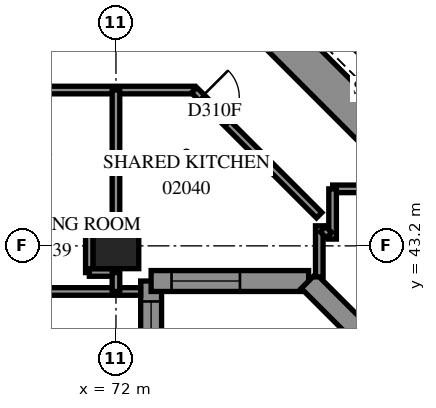
"""IFC4 building model, lengths in metres.
Left out: names, types, materials, properties, quantities, classifications, styles, units other than length and angle.
Written with IfcOpenShell. Run it as: python <this file> out.ifc"""

import sys

from ifc_helpers import new_model, si_unit, direction, frame, frame_2d, origin, origin_2d, place, context, subcontext, project, spatial, polyline, rectangle, outline, extrude, element, fill, save


model = new_model("IFC4")
c1 = context("Model", 3, precision=1e-05, world=origin(), true_north=direction((0.0, 1.0)))
c2 = subcontext(c1, "Body", "Model", "MODEL_VIEW")
j1 = project(units=[si_unit("LENGTHUNIT", "METRE"), si_unit("PLANEANGLEUNIT", "RADIAN")], contexts=[c1])
p1 = place(None, origin())
s1 = spatial("IfcSite", under=j1, at=p1, CompositionType="ELEMENT")
p2 = place(p1, origin())
s2 = spatial("IfcBuilding", under=s1, at=p2, CompositionType="ELEMENT")
p3 = place(p2, frame((0.0, 0.0, 10.2)))
s3 = spatial("IfcBuildingStorey", under=s2, at=p3, CompositionType="ELEMENT", Elevation=10.2)
p4 = place(p3, frame((72.0, 43.2, 0.0), z_axis=(0.0, 0.0, 1.0), x_axis=(1.0, 0.0, 0.0)))
e1 = element("IfcColumn", 1, at=p4, inside=s3, PredefinedType="COLUMN", context=c2, shape_type="SweptSolid", body=[
    extrude(rectangle(XDim=1.2, YDim=1.2, at=origin_2d()), origin(), (0.0, 0.0, 1.0), 3.8),
])
p5 = place(p3, frame((75.594, 49.443, -0.4), z_axis=(0.0, 0.0, 1.0), x_axis=(0.7071037324, -0.70710983, 0.0)))
e2 = element("IfcWall", 2, at=p5, inside=s3, PredefinedType="SHEAR", context=c2, shape_type="SweptSolid", body=[
    extrude(rectangle(XDim=16.4, YDim=1.0, at=frame_2d((8.2, 0.0))), origin(), (0.0, 0.0, 1.0), 3.5),
])
p6 = place(p3, frame((72.925, 20.675, 0.0), z_axis=(0.0, 0.0, 1.0), x_axis=(0.0, 1.0, 0.0)))
e3 = element("IfcWall", 3, at=p6, inside=s3, PredefinedType="SOLIDWALL", context=c2, shape_type="SweptSolid", body=[
    extrude(outline(polyline([(-0.275, -0.275), (21.325, -0.275), (21.875, 0.275), (0.275, 0.275), (-0.275, -0.275)])), origin(), (0.0, 0.0, 1.0), 3.8),
])
p7 = place(p6, frame((1.825, 0.0, 0.7)))
e4 = element("IfcOpeningElement", 4, at=p7, cuts=e3, PredefinedType="OPENING", context=c2, shape_type="SweptSolid", body=[
    extrude(rectangle(XDim=1.8, YDim=2.6, at=frame_2d((0.9, 1.3))), frame((0.0, 0.285, 0.0), z_axis=(0.0, -1.0, 0.0), x_axis=(1.0, 0.0, 0.0)), (0.0, 0.0, 1.0), 0.57),
])
p8 = place(p6, frame((5.425, 0.0, 0.7)))
e5 = element("IfcOpeningElement", 5, at=p8, cuts=e3, PredefinedType="OPENING", context=c2, shape_type="SweptSolid", body=[
    extrude(rectangle(XDim=1.8, YDim=2.6, at=frame_2d((0.9, 1.3))), frame((0.0, 0.285, 0.0), z_axis=(0.0, -1.0, 0.0), x_axis=(1.0, 0.0, 0.0)), (0.0, 0.0, 1.0), 0.57),
])
p9 = place(p6, frame((9.025, 0.0, 0.7)))
e6 = element("IfcOpeningElement", 6, at=p9, cuts=e3, PredefinedType="OPENING", context=c2, shape_type="SweptSolid", body=[
    extrude(rectangle(XDim=1.8, YDim=2.6, at=frame_2d((0.9, 1.3))), frame((0.0, 0.285, 0.0), z_axis=(0.0, -1.0, 0.0), x_axis=(1.0, 0.0, 0.0)), (0.0, 0.0, 1.0), 0.57),
])
p10 = place(p6, frame((12.625, 0.0, 0.7)))
e7 = element("IfcOpeningElement", 7, at=p10, cuts=e3, PredefinedType="OPENING", context=c2, shape_type="SweptSolid", body=[
    extrude(rectangle(XDim=1.8, YDim=2.6, at=frame_2d((0.9, 1.3))), frame((0.0, 0.285, 0.0), z_axis=(0.0, -1.0, 0.0), x_axis=(1.0, 0.0, 0.0)), (0.0, 0.0, 1.0), 0.57),
])
p11 = place(p6, frame((16.225, 0.0, 0.7)))
e8 = element("IfcOpeningElement", 8, at=p11, cuts=e3, PredefinedType="OPENING", context=c2, shape_type="SweptSolid", body=[
    extrude(rectangle(XDim=1.8, YDim=2.6, at=frame_2d((0.9, 1.3))), frame((0.0, 0.285, 0.0), z_axis=(0.0, -1.0, 0.0), x_axis=(1.0, 0.0, 0.0)), (0.0, 0.0, 1.0), 0.57),
])
p12 = place(p6, frame((19.262, 0.0, 0.7)))
e9 = element("IfcOpeningElement", 9, at=p12, cuts=e3, PredefinedType="OPENING", context=c2, shape_type="SweptSolid", body=[
    extrude(rectangle(XDim=1.8, YDim=2.6, at=frame_2d((0.9, 1.3))), frame((0.0, 0.285, 0.0), z_axis=(0.0, -1.0, 0.0), x_axis=(1.0, 0.0, 0.0)), (0.0, 0.0, 1.0), 0.57),
])
p13 = place(p3, frame((72.925, 42.275, 0.0), z_axis=(0.0, 0.0, 1.0), x_axis=(1.0, 0.0, 0.0)))
e10 = element("IfcWall", 10, at=p13, inside=s3, PredefinedType="SOLIDWALL", context=c2, shape_type="SweptSolid", body=[
    extrude(outline(polyline([(0.275, -0.275), (4.031, -0.275), (4.259, 0.275), (-0.275, 0.275), (0.275, -0.275)])), origin(), (0.0, 0.0, 1.0), 3.8),
])
p14 = place(p13, frame((0.537, 0.0, 0.7)))
e11 = element("IfcOpeningElement", 11, at=p14, cuts=e10, PredefinedType="OPENING", context=c2, shape_type="SweptSolid", body=[
    extrude(rectangle(XDim=1.8, YDim=2.6, at=frame_2d((0.9, 1.3))), frame((0.0, 0.285, 0.0), z_axis=(0.0, -1.0, 0.0), x_axis=(1.0, 0.0, 0.0)), (0.0, 0.0, 1.0), 0.57),
])
p15 = place(p3, frame((77.07, 42.275, 0.0), z_axis=(0.0, 0.0, 1.0), x_axis=(0.7071067812, -0.7071067812, 0.0)))
e12 = element("IfcWall", 12, at=p15, inside=s3, PredefinedType="SOLIDWALL", context=c2, shape_type="SweptSolid", body=[
    extrude(outline(polyline([(0.114, -0.275), (39.288, -0.275), (38.737, 0.275), (-0.114, 0.275), (0.114, -0.275)])), origin(), (0.0, 0.0, 1.0), 3.8),
])
p16 = place(p15, frame((2.837, 0.0, 0.7)))
e13 = element("IfcOpeningElement", 13, at=p16, cuts=e12, PredefinedType="OPENING", context=c2, shape_type="SweptSolid", body=[
    extrude(rectangle(XDim=1.8, YDim=2.6, at=frame_2d((0.9, 1.3))), frame((0.0, 0.285, 0.0), z_axis=(0.0, -1.0, 0.0), x_axis=(1.0, 0.0, 0.0)), (0.0, 0.0, 1.0), 0.57),
])
p17 = place(p15, frame((6.588, 0.0, 0.7)))
e14 = element("IfcOpeningElement", 14, at=p17, cuts=e12, PredefinedType="OPENING", context=c2, shape_type="SweptSolid", body=[
    extrude(rectangle(XDim=1.8, YDim=2.6, at=frame_2d((0.9, 1.3))), frame((0.0, 0.285, 0.0), z_axis=(0.0, -1.0, 0.0), x_axis=(1.0, 0.0, 0.0)), (0.0, 0.0, 1.0), 0.57),
])
p18 = place(p15, frame((10.188, 0.0, 0.7)))
e15 = element("IfcOpeningElement", 15, at=p18, cuts=e12, PredefinedType="OPENING", context=c2, shape_type="SweptSolid", body=[
    extrude(rectangle(XDim=1.8, YDim=2.6, at=frame_2d((0.9, 1.3))), frame((0.0, 0.285, 0.0), z_axis=(0.0, -1.0, 0.0), x_axis=(1.0, 0.0, 0.0)), (0.0, 0.0, 1.0), 0.57),
])
p19 = place(p15, frame((13.787, 0.0, 0.7)))
e16 = element("IfcOpeningElement", 16, at=p19, cuts=e12, PredefinedType="OPENING", context=c2, shape_type="SweptSolid", body=[
    extrude(rectangle(XDim=1.8, YDim=2.6, at=frame_2d((0.9, 1.3))), frame((0.0, 0.285, 0.0), z_axis=(0.0, -1.0, 0.0), x_axis=(1.0, 0.0, 0.0)), (0.0, 0.0, 1.0), 0.57),
])
p20 = place(p15, frame((17.387, 0.0, 0.7)))
e17 = element("IfcOpeningElement", 17, at=p20, cuts=e12, PredefinedType="OPENING", context=c2, shape_type="SweptSolid", body=[
    extrude(rectangle(XDim=1.8, YDim=2.6, at=frame_2d((0.9, 1.3))), frame((0.0, 0.285, 0.0), z_axis=(0.0, -1.0, 0.0), x_axis=(1.0, 0.0, 0.0)), (0.0, 0.0, 1.0), 0.57),
])
p21 = place(p15, frame((20.988, 0.0, 0.7)))
e18 = element("IfcOpeningElement", 18, at=p21, cuts=e12, PredefinedType="OPENING", context=c2, shape_type="SweptSolid", body=[
    extrude(rectangle(XDim=1.8, YDim=2.6, at=frame_2d((0.9, 1.3))), frame((0.0, 0.285, 0.0), z_axis=(0.0, -1.0, 0.0), x_axis=(1.0, 0.0, 0.0)), (0.0, 0.0, 1.0), 0.57),
])
p22 = place(p15, frame((24.587, 0.0, 0.7)))
e19 = element("IfcOpeningElement", 19, at=p22, cuts=e12, PredefinedType="OPENING", context=c2, shape_type="SweptSolid", body=[
    extrude(rectangle(XDim=1.8, YDim=2.6, at=frame_2d((0.9, 1.3))), frame((0.0, 0.285, 0.0), z_axis=(0.0, -1.0, 0.0), x_axis=(1.0, 0.0, 0.0)), (0.0, 0.0, 1.0), 0.57),
])
p23 = place(p15, frame((28.188, 0.0, 0.7)))
e20 = element("IfcOpeningElement", 20, at=p23, cuts=e12, PredefinedType="OPENING", context=c2, shape_type="SweptSolid", body=[
    extrude(rectangle(XDim=1.8, YDim=2.6, at=frame_2d((0.9, 1.3))), frame((0.0, 0.285, 0.0), z_axis=(0.0, -1.0, 0.0), x_axis=(1.0, 0.0, 0.0)), (0.0, 0.0, 1.0), 0.57),
])
p24 = place(p15, frame((31.788, 0.0, 0.7)))
e21 = element("IfcOpeningElement", 21, at=p24, cuts=e12, PredefinedType="OPENING", context=c2, shape_type="SweptSolid", body=[
    extrude(rectangle(XDim=1.8, YDim=2.6, at=frame_2d((0.9, 1.3))), frame((0.0, 0.285, 0.0), z_axis=(0.0, -1.0, 0.0), x_axis=(1.0, 0.0, 0.0)), (0.0, 0.0, 1.0), 0.57),
])
p25 = place(p15, frame((35.388, 0.0, 0.7)))
e22 = element("IfcOpeningElement", 22, at=p25, cuts=e12, PredefinedType="OPENING", context=c2, shape_type="SweptSolid", body=[
    extrude(rectangle(XDim=1.8, YDim=2.6, at=frame_2d((0.9, 1.3))), frame((0.0, 0.285, 0.0), z_axis=(0.0, -1.0, 0.0), x_axis=(1.0, 0.0, 0.0)), (0.0, 0.0, 1.0), 0.57),
])
p26 = place(p3, frame((13.75, 42.0, 0.0), z_axis=(0.0, 0.0, 1.0), x_axis=(1.0, 0.0, 0.0)))
e23 = element("IfcWall", 23, at=p26, inside=s3, PredefinedType="PARTITIONING", context=c2, shape_type="SweptSolid", body=[
    extrude(rectangle(XDim=58.9, YDim=0.2, at=frame_2d((29.45, 0.0))), origin(), (0.0, 0.0, 1.0), 3.8),
])
p27 = place(p3, frame((54.5, 47.3, 0.0), z_axis=(0.0, 0.0, 1.0), x_axis=(1.0, 0.0, 0.0)))
e24 = element("IfcWall", 24, at=p27, inside=s3, PredefinedType="PARTITIONING", context=c2, shape_type="SweptSolid", body=[
    extrude(rectangle(XDim=19.56, YDim=0.2, at=frame_2d((9.78, 0.0))), origin(), (0.0, 0.0, 1.0), 3.8),
])
p28 = place(p27, frame((0.252, 0.0, 0.0)))
e25 = element("IfcOpeningElement", 25, at=p28, cuts=e24, PredefinedType="OPENING", context=c2, shape_type="SweptSolid", body=[
    extrude(rectangle(XDim=1.0, YDim=2.1, at=frame_2d((0.5, 1.05))), frame((0.0, 0.11, 0.0), z_axis=(0.0, -1.0, 0.0), x_axis=(1.0, 0.0, 0.0)), (0.0, 0.0, 1.0), 0.22),
])
p29 = place(p27, frame((4.865, 0.0, 0.0)))
e26 = element("IfcOpeningElement", 26, at=p29, cuts=e24, PredefinedType="OPENING", context=c2, shape_type="SweptSolid", body=[
    extrude(rectangle(XDim=1.0, YDim=2.1, at=frame_2d((0.5, 1.05))), frame((0.0, 0.11, 0.0), z_axis=(0.0, -1.0, 0.0), x_axis=(1.0, 0.0, 0.0)), (0.0, 0.0, 1.0), 0.22),
])
p30 = place(p27, frame((7.225, 0.0, 0.0)))
e27 = element("IfcOpeningElement", 27, at=p30, cuts=e24, PredefinedType="OPENING", context=c2, shape_type="SweptSolid", body=[
    extrude(rectangle(XDim=1.0, YDim=2.1, at=frame_2d((0.5, 1.05))), frame((0.0, 0.11, 0.0), z_axis=(0.0, -1.0, 0.0), x_axis=(1.0, 0.0, 0.0)), (0.0, 0.0, 1.0), 0.22),
])
p31 = place(p27, frame((12.065, 0.0, 0.0)))
e28 = element("IfcOpeningElement", 28, at=p31, cuts=e24, PredefinedType="OPENING", context=c2, shape_type="SweptSolid", body=[
    extrude(rectangle(XDim=1.0, YDim=2.1, at=frame_2d((0.5, 1.05))), frame((0.0, 0.11, 0.0), z_axis=(0.0, -1.0, 0.0), x_axis=(1.0, 0.0, 0.0)), (0.0, 0.0, 1.0), 0.22),
])
p32 = place(p27, frame((14.425, 0.0, 0.0)))
e29 = element("IfcOpeningElement", 29, at=p32, cuts=e24, PredefinedType="OPENING", context=c2, shape_type="SweptSolid", body=[
    extrude(rectangle(XDim=1.0, YDim=2.1, at=frame_2d((0.5, 1.05))), frame((0.0, 0.11, 0.0), z_axis=(0.0, -1.0, 0.0), x_axis=(1.0, 0.0, 0.0)), (0.0, 0.0, 1.0), 0.22),
])
p33 = place(p3, frame((74.057, 47.297, 0.0), z_axis=(0.0, 0.0, 1.0), x_axis=(0.7071067812, -0.7071067812, 0.0)))
e30 = element("IfcWall", 30, at=p33, inside=s3, PredefinedType="PARTITIONING", context=c2, shape_type="SweptSolid", body=[
    extrude(rectangle(XDim=4.653, YDim=0.2, at=frame_2d((2.326, 0.0))), origin(), (0.0, 0.0, 1.0), 3.8),
])
p34 = place(p33, frame((0.267, 0.0, 0.0)))
e31 = element("IfcOpeningElement", 31, at=p34, cuts=e30, PredefinedType="OPENING", context=c2, shape_type="SweptSolid", body=[
    extrude(rectangle(XDim=1.0, YDim=2.1, at=frame_2d((0.5, 1.05))), frame((0.0, 0.11, 0.0), z_axis=(0.0, -1.0, 0.0), x_axis=(1.0, 0.0, 0.0)), (0.0, 0.0, 1.0), 0.22),
])
p35 = place(p3, frame((72.0, 43.906, 0.0), z_axis=(0.0, 0.0, 1.0), x_axis=(0.0, 1.0, 0.0)))
e32 = element("IfcWall", 32, at=p35, inside=s3, PredefinedType="PARTITIONING", context=c2, shape_type="SweptSolid", body=[
    extrude(rectangle(XDim=3.394, YDim=0.2, at=frame_2d((1.697, 0.0))), origin(), (0.0, 0.0, 1.0), 3.8),
])
p36 = place(p3, frame((77.702, 44.7, 0.0), z_axis=(0.0, 0.0, 1.0), x_axis=(1.0, 0.0, 0.0)))
e33 = element("IfcWall", 33, at=p36, inside=s3, PredefinedType="PARTITIONING", context=c2, shape_type="SweptSolid", body=[
    extrude(rectangle(XDim=1.814, YDim=0.2, at=frame_2d((0.907, 0.0))), origin(), (0.0, 0.0, 1.0), 3.8),
])
p37 = place(p3, frame((71.3, 42.496, 0.0), z_axis=(0.0, 0.0, 1.0), x_axis=(0.0, 1.0, 0.0)))
e34 = element("IfcWall", 34, at=p37, inside=s3, PredefinedType="PARTITIONING", context=c2, shape_type="SweptSolid", body=[
    extrude(rectangle(XDim=1.41, YDim=0.2, at=frame_2d((0.705, 0.0))), origin(), (0.0, 0.0, 1.0), 3.8),
])
p38 = place(p3, frame((77.7, 43.378, 0.0), z_axis=(0.0, 0.0, 1.0), x_axis=(0.0, 1.0, 0.0)))
e35 = element("IfcWall", 35, at=p38, inside=s3, PredefinedType="PARTITIONING", context=c2, shape_type="SweptSolid", body=[
    extrude(rectangle(XDim=1.322, YDim=0.2, at=frame_2d((0.661, 0.0))), origin(), (0.0, 0.0, 1.0), 3.8),
])
p39 = place(p3, frame((77.35, 42.384, 0.0), z_axis=(0.0, 0.0, 1.0), x_axis=(0.0, 1.0, 0.0)))
e36 = element("IfcWall", 36, at=p39, inside=s3, PredefinedType="PARTITIONING", context=c2, shape_type="SweptSolid", body=[
    extrude(rectangle(XDim=1.344, YDim=0.2, at=frame_2d((0.672, 0.0))), origin(), (0.0, 0.0, 1.0), 3.8),
])
for number, where, z_axis, x_axis in (
    (37, (71.3, 43.91, 0.0), (0.0, 0.0, 1.0), (1.0, 0.0, 0.0)),
    (38, (71.3, 42.5, 0.0), (0.0, 0.0, 1.0), (1.0, 0.0, 0.0)),
):
    element("IfcWall", number, at=place(p3, frame(where, z_axis=z_axis, x_axis=x_axis)), inside=s3, PredefinedType="PARTITIONING", context=c2, shape_type="SweptSolid", body=[
        extrude(rectangle(XDim=0.7, YDim=0.2, at=frame_2d((0.35, 0.0))), origin(), (0.0, 0.0, 1.0), 3.8),
    ])
p40 = place(p3, frame((72.0, 42.0, 0.0), z_axis=(0.0, 0.0, 1.0), x_axis=(0.0, 1.0, 0.0)))
e39 = element("IfcWall", 39, at=p40, inside=s3, PredefinedType="PARTITIONING", context=c2, shape_type="SweptSolid", body=[
    extrude(rectangle(XDim=0.496, YDim=0.2, at=frame_2d((0.248, 0.0))), origin(), (0.0, 0.0, 1.0), 3.2),
])
p41 = place(p3, frame((77.445, 43.64, 0.0), z_axis=(0.0, 0.0, 1.0), x_axis=(0.7071067812, -0.7071067812, 0.0)))
e40 = element("IfcWall", 40, at=p41, inside=s3, PredefinedType="PARTITIONING", context=c2, shape_type="SweptSolid", body=[
    extrude(rectangle(XDim=0.225, YDim=0.2, at=frame_2d((0.113, 0.0))), origin(), (0.0, 0.0, 1.0), 3.8),
])
p42 = place(p12, origin())
e41 = element("IfcWindow", 41, at=p42, inside=s3, PartitioningType="SINGLE_PANEL", PredefinedType="WINDOW", context=c2, shape_type="SweptSolid", body=[
    extrude(rectangle(XDim=1.8, YDim=2.6, at=frame_2d((0.9, 1.3))), frame((0.0, 0.155, 0.0), z_axis=(0.0, -1.0, 0.0), x_axis=(1.0, 0.0, 0.0)), (0.0, 0.0, 1.0), 0.06),
])
fill(e9, e41)
p43 = place(p14, origin())
e42 = element("IfcWindow", 42, at=p43, inside=s3, PartitioningType="SINGLE_PANEL", PredefinedType="WINDOW", context=c2, shape_type="SweptSolid", body=[
    extrude(rectangle(XDim=1.8, YDim=2.6, at=frame_2d((0.9, 1.3))), frame((0.0, 0.155, 0.0), z_axis=(0.0, -1.0, 0.0), x_axis=(1.0, 0.0, 0.0)), (0.0, 0.0, 1.0), 0.06),
])
fill(e11, e42)
p44 = place(p34, origin())
e43 = element("IfcDoor", 43, at=p44, inside=s3, OperationType="SINGLE_SWING_LEFT", PredefinedType="DOOR", context=c2, shape_type="SweptSolid", body=[
    extrude(rectangle(XDim=1.0, YDim=2.1, at=frame_2d((0.5, 1.05))), frame((0.0, 0.025, 0.0), z_axis=(0.0, -1.0, 0.0), x_axis=(1.0, 0.0, 0.0)), (0.0, 0.0, 1.0), 0.05),
])
fill(e31, e43)
save(model, sys.argv[1])
